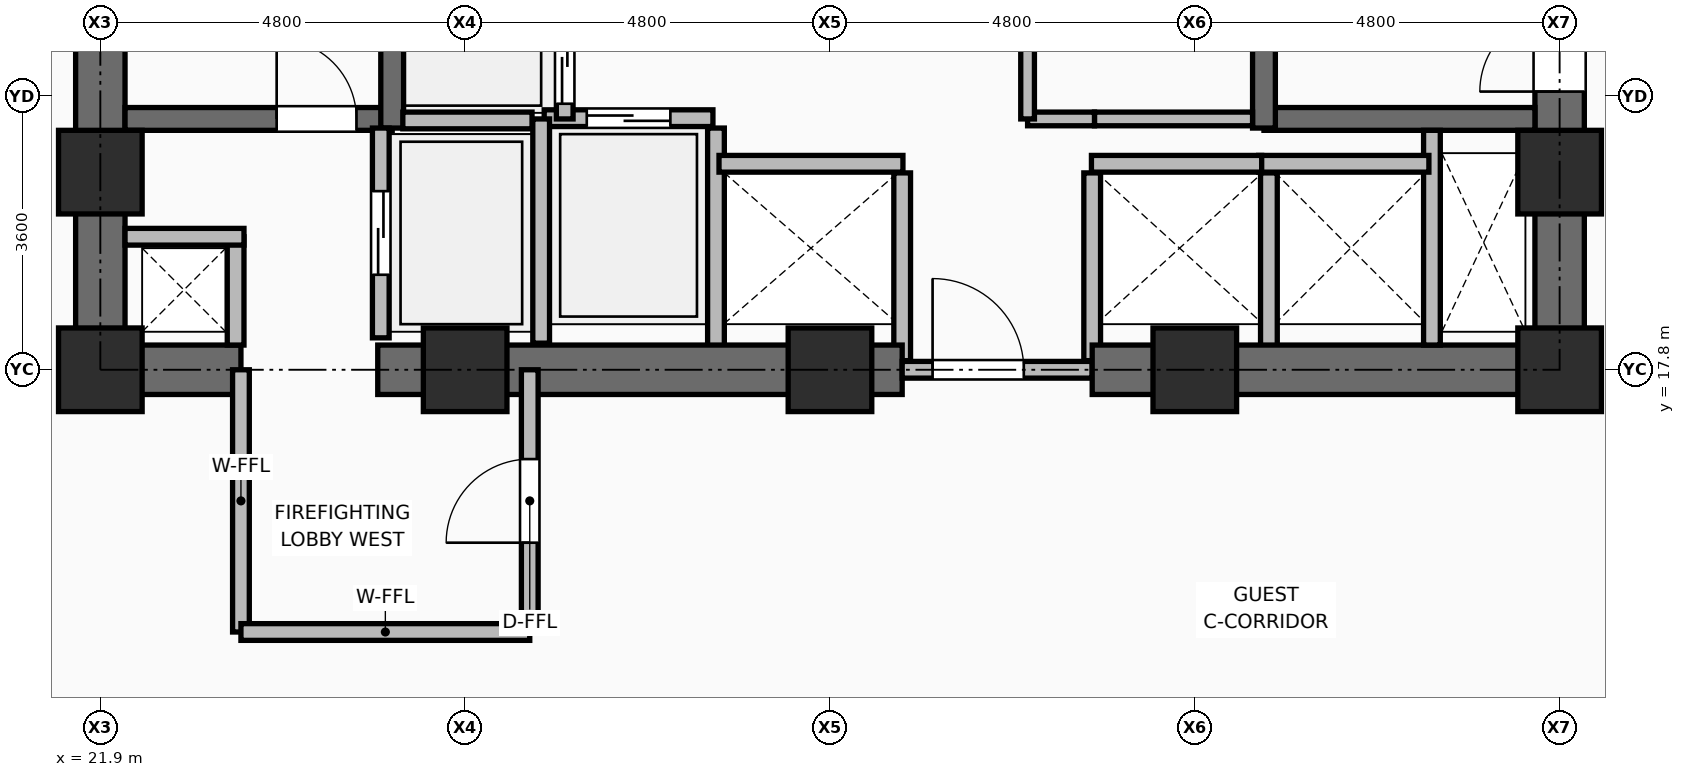
"""IFC4 building model, lengths in metres.
Left out: names, types, materials, properties, quantities, classifications, styles, units other than length and angle.
Written with IfcOpenShell. Run it as: python <this file> out.ifc"""

import sys

from ifc_helpers import new_model, si_unit, direction, frame, frame_2d, origin, origin_2d, place, context, subcontext, project, spatial, rectangle, extrude, element, fill, save


model = new_model("IFC4")
c1 = context("Model", 3, precision=1e-05, world=origin(), true_north=direction((0.0, 1.0)))
c2 = subcontext(c1, "Body", "Model", "MODEL_VIEW")
j1 = project(units=[si_unit("LENGTHUNIT", "METRE"), si_unit("PLANEANGLEUNIT", "RADIAN")], contexts=[c1])
p1 = place(None, origin())
s1 = spatial("IfcSite", under=j1, at=p1, CompositionType="ELEMENT")
p2 = place(p1, origin())
s2 = spatial("IfcBuilding", under=s1, at=p2, CompositionType="ELEMENT")
p3 = place(p2, frame((0.0, 0.0, 60.75)))
s3 = spatial("IfcBuildingStorey", under=s2, at=p3, CompositionType="ELEMENT", Elevation=60.75)
for number, where, z_axis, x_axis in (
    (1, (21.9, 17.8, 0.0), (0.0, 0.0, 1.0), (1.0, 0.0, 0.0)),
    (2, (26.7, 17.8, 0.0), (0.0, 0.0, 1.0), (1.0, 0.0, 0.0)),
    (3, (31.5, 17.8, 0.0), (0.0, 0.0, 1.0), (1.0, 0.0, 0.0)),
    (4, (36.3, 17.8, 0.0), (0.0, 0.0, 1.0), (1.0, 0.0, 0.0)),
    (5, (41.1, 17.8, 0.0), (0.0, 0.0, 1.0), (1.0, 0.0, 0.0)),
    (6, (21.9, 20.4, 0.0), (0.0, 0.0, 1.0), (1.0, 0.0, 0.0)),
    (7, (41.1, 20.4, 0.0), (0.0, 0.0, 1.0), (1.0, 0.0, 0.0)),
):
    element("IfcColumn", number, at=place(p3, frame(where, z_axis=z_axis, x_axis=x_axis)), inside=s3, PredefinedType="COLUMN", context=c2, shape_type="SweptSolid", body=[
        extrude(rectangle(XDim=1.1, YDim=1.1, at=origin_2d()), origin(), (0.0, 0.0, 1.0), 3.75),
    ])
p4 = place(p3, frame((30.0, 18.08, 0.0), z_axis=(0.0, 0.0, 1.0), x_axis=(0.0, 1.0, 0.0)))
e8 = element("IfcWall", 8, at=p4, inside=s3, PredefinedType="PARTITIONING", context=c2, shape_type="SweptSolid", body=[
    extrude(rectangle(XDim=2.9, YDim=0.22, at=frame_2d((1.45, 0.0))), origin(), (0.0, 0.0, 1.0), 3.545),
])
for number, where, z_axis, x_axis in (
    (9, (32.45, 17.92, 0.0), (0.0, 0.0, 1.0), (0.0, 1.0, 0.0)),
    (10, (34.95, 17.92, 0.0), (0.0, 0.0, 1.0), (0.0, 1.0, 0.0)),
):
    element("IfcWall", number, at=place(p3, frame(where, z_axis=z_axis, x_axis=x_axis)), inside=s3, PredefinedType="PARTITIONING", context=c2, shape_type="SweptSolid", body=[
        extrude(rectangle(XDim=2.47, YDim=0.22, at=frame_2d((1.235, 0.0))), origin(), (0.0, 0.0, 1.0), 2.928),
    ])
p5 = place(p3, frame((37.275, 18.08, 0.0), z_axis=(0.0, 0.0, 1.0), x_axis=(0.0, 1.0, 0.0)))
e11 = element("IfcWall", 11, at=p5, inside=s3, PredefinedType="PARTITIONING", context=c2, shape_type="SweptSolid", body=[
    extrude(rectangle(XDim=2.31, YDim=0.22, at=frame_2d((1.155, 0.0))), origin(), (0.0, 0.0, 1.0), 3.545),
])
p6 = place(p3, frame((21.575, 17.8, 0.0), z_axis=(0.0, 0.0, 1.0), x_axis=(1.0, 0.0, 0.0)))
e12 = element("IfcWall", 12, at=p6, inside=s3, PredefinedType="SHEAR", context=c2, shape_type="SweptSolid", body=[
    extrude(rectangle(XDim=2.175, YDim=0.65, at=frame_2d((1.087, 0.0))), origin(), (0.0, 0.0, 1.0), 3.57),
])
p7 = place(p3, frame((25.55, 17.8, 0.0), z_axis=(0.0, 0.0, 1.0), x_axis=(1.0, 0.0, 0.0)))
e13 = element("IfcWall", 13, at=p7, inside=s3, PredefinedType="SHEAR", context=c2, shape_type="SweptSolid", body=[
    extrude(rectangle(XDim=6.9, YDim=0.65, at=frame_2d((3.45, 0.0))), origin(), (0.0, 0.0, 1.0), 3.57),
])
p8 = place(p3, frame((32.45, 17.8, 0.0), z_axis=(0.0, 0.0, 1.0), x_axis=(1.0, 0.0, 0.0)))
e14 = element("IfcWall", 14, at=p8, inside=s3, PredefinedType="PARTITIONING", context=c2, shape_type="SweptSolid", body=[
    extrude(rectangle(XDim=2.5, YDim=0.22, at=frame_2d((1.25, 0.0))), origin(), (0.0, 0.0, 1.0), 2.928),
])
p9 = place(p8, frame((0.4, 0.0, 0.0)))
e15 = element("IfcOpeningElement", 15, at=p9, cuts=e14, PredefinedType="OPENING", context=c2, shape_type="SweptSolid", body=[
    extrude(rectangle(XDim=1.2, YDim=2.1, at=frame_2d((0.6, 1.05))), frame((0.0, 0.12, 0.0), z_axis=(0.0, -1.0, 0.0), x_axis=(1.0, 0.0, 0.0)), (0.0, 0.0, 1.0), 0.24),
])
p10 = place(p3, frame((34.95, 17.8, 0.0), z_axis=(0.0, 0.0, 1.0), x_axis=(1.0, 0.0, 0.0)))
e16 = element("IfcWall", 16, at=p10, inside=s3, PredefinedType="SHEAR", context=c2, shape_type="SweptSolid", body=[
    extrude(rectangle(XDim=6.475, YDim=0.65, at=frame_2d((3.238, 0.0))), origin(), (0.0, 0.0, 1.0), 3.57),
])
p11 = place(p3, frame((21.9, 18.125, 0.0), z_axis=(0.0, 0.0, 1.0), x_axis=(0.0, 1.0, 0.0)))
e17 = element("IfcWall", 17, at=p11, inside=s3, PredefinedType="SHEAR", context=c2, shape_type="SweptSolid", body=[
    extrude(rectangle(XDim=14.0, YDim=0.65, at=frame_2d((7.0, 0.0))), origin(), (0.0, 0.0, 1.0), 3.57),
])
p12 = place(p3, frame((41.1, 18.125, 0.0), z_axis=(0.0, 0.0, 1.0), x_axis=(0.0, 1.0, 0.0)))
e18 = element("IfcWall", 18, at=p12, inside=s3, PredefinedType="SHEAR", context=c2, shape_type="SweptSolid", body=[
    extrude(rectangle(XDim=14.0, YDim=0.65, at=frame_2d((7.0, 0.0))), origin(), (0.0, 0.0, 1.0), 3.57),
])
p13 = place(p12, frame((3.335, 0.0, 0.0)))
e19 = element("IfcOpeningElement", 19, at=p13, cuts=e18, PredefinedType="OPENING", context=c2, shape_type="SweptSolid", body=[
    extrude(rectangle(XDim=1.05, YDim=2.1, at=frame_2d((0.525, 1.05))), frame((0.0, 0.335, 0.0), z_axis=(0.0, -1.0, 0.0), x_axis=(1.0, 0.0, 0.0)), (0.0, 0.0, 1.0), 0.67),
])
p14 = place(p3, frame((22.225, 21.1, 0.0), z_axis=(0.0, 0.0, 1.0), x_axis=(1.0, 0.0, 0.0)))
e20 = element("IfcWall", 20, at=p14, inside=s3, PredefinedType="SHEAR", context=c2, shape_type="SweptSolid", body=[
    extrude(rectangle(XDim=3.515, YDim=0.3, at=frame_2d((1.757, 0.0))), origin(), (0.0, 0.0, 1.0), 3.57),
])
p15 = place(p14, frame((1.995, 0.0, 0.0)))
e21 = element("IfcOpeningElement", 21, at=p15, cuts=e20, PredefinedType="OPENING", context=c2, shape_type="SweptSolid", body=[
    extrude(rectangle(XDim=1.05, YDim=2.1, at=frame_2d((0.525, 1.05))), frame((0.0, 0.16, 0.0), z_axis=(0.0, -1.0, 0.0), x_axis=(1.0, 0.0, 0.0)), (0.0, 0.0, 1.0), 0.32),
])
p16 = place(p3, frame((25.74, 20.98, 0.0), z_axis=(0.0, 0.0, 1.0), x_axis=(0.0, 1.0, 0.0)))
e22 = element("IfcWall", 22, at=p16, inside=s3, PredefinedType="SHEAR", context=c2, shape_type="SweptSolid", body=[
    extrude(rectangle(XDim=7.99, YDim=0.3, at=frame_2d((3.995, 0.0))), origin(), (0.0, 0.0, 1.0), 3.57),
])
p17 = place(p3, frame((37.21, 21.1, 0.0), z_axis=(0.0, 0.0, 1.0), x_axis=(1.0, 0.0, 0.0)))
e23 = element("IfcWall", 23, at=p17, inside=s3, PredefinedType="SHEAR", context=c2, shape_type="SweptSolid", body=[
    extrude(rectangle(XDim=3.565, YDim=0.3, at=frame_2d((1.782, 0.0))), origin(), (0.0, 0.0, 1.0), 3.57),
])
p18 = place(p3, frame((37.21, 20.98, 0.0), z_axis=(0.0, 0.0, 1.0), x_axis=(0.0, 1.0, 0.0)))
e24 = element("IfcWall", 24, at=p18, inside=s3, PredefinedType="SHEAR", context=c2, shape_type="SweptSolid", body=[
    extrude(rectangle(XDim=7.99, YDim=0.3, at=frame_2d((3.995, 0.0))), origin(), (0.0, 0.0, 1.0), 3.57),
])
p19 = place(p3, frame((23.68, 18.125, 0.0), z_axis=(0.0, 0.0, 1.0), x_axis=(0.0, 1.0, 0.0)))
e25 = element("IfcWall", 25, at=p19, inside=s3, PredefinedType="PARTITIONING", context=c2, shape_type="SweptSolid", body=[
    extrude(rectangle(XDim=1.425, YDim=0.22, at=frame_2d((0.712, 0.0))), origin(), (0.0, 0.0, 1.0), 3.55),
])
p20 = place(p3, frame((22.225, 19.55, 0.0), z_axis=(0.0, 0.0, 1.0), x_axis=(1.0, 0.0, 0.0)))
e26 = element("IfcWall", 26, at=p20, inside=s3, PredefinedType="PARTITIONING", context=c2, shape_type="SweptSolid", body=[
    extrude(rectangle(XDim=1.565, YDim=0.22, at=frame_2d((0.782, 0.0))), origin(), (0.0, 0.0, 1.0), 2.595),
])
p21 = place(p3, frame((39.42, 18.125, 0.0), z_axis=(0.0, 0.0, 1.0), x_axis=(0.0, 1.0, 0.0)))
e27 = element("IfcWall", 27, at=p21, inside=s3, PredefinedType="PARTITIONING", context=c2, shape_type="SweptSolid", body=[
    extrude(rectangle(XDim=2.825, YDim=0.22, at=frame_2d((1.413, 0.0))), origin(), (0.0, 0.0, 1.0), 3.55),
])
p22 = place(p3, frame((25.59, 18.22, 0.0), z_axis=(0.0, 0.0, 1.0), x_axis=(0.0, 1.0, 0.0)))
e28 = element("IfcWall", 28, at=p22, inside=s3, PredefinedType="PARTITIONING", context=c2, shape_type="SweptSolid", body=[
    extrude(rectangle(XDim=2.76, YDim=0.22, at=frame_2d((1.38, 0.0))), origin(), (0.0, 0.0, 1.0), 3.55),
])
p23 = place(p22, frame((0.83, 0.0, 0.0)))
e29 = element("IfcOpeningElement", 29, at=p23, cuts=e28, PredefinedType="OPENING", context=c2, shape_type="SweptSolid", body=[
    extrude(rectangle(XDim=1.1, YDim=2.2, at=frame_2d((0.55, 1.1))), frame((0.0, 0.12, 0.0), z_axis=(0.0, -1.0, 0.0), x_axis=(1.0, 0.0, 0.0)), (0.0, 0.0, 1.0), 0.24),
])
p24 = place(p3, frame((27.74, 21.11, 0.0), z_axis=(0.0, 0.0, 1.0), x_axis=(1.0, 0.0, 0.0)))
e30 = element("IfcWall", 30, at=p24, inside=s3, PredefinedType="PARTITIONING", context=c2, shape_type="SweptSolid", body=[
    extrude(rectangle(XDim=2.22, YDim=0.22, at=frame_2d((1.11, 0.0))), origin(), (0.0, 0.0, 1.0), 3.55),
])
p25 = place(p24, frame((0.56, 0.0, 0.0)))
e31 = element("IfcOpeningElement", 31, at=p25, cuts=e30, PredefinedType="OPENING", context=c2, shape_type="SweptSolid", body=[
    extrude(rectangle(XDim=1.1, YDim=2.2, at=frame_2d((0.55, 1.1))), frame((0.0, 0.12, 0.0), z_axis=(0.0, -1.0, 0.0), x_axis=(1.0, 0.0, 0.0)), (0.0, 0.0, 1.0), 0.24),
])
p26 = place(p3, frame((30.04, 20.51, 0.0), z_axis=(0.0, 0.0, 1.0), x_axis=(1.0, 0.0, 0.0)))
e32 = element("IfcWall", 32, at=p26, inside=s3, PredefinedType="PARTITIONING", context=c2, shape_type="SweptSolid", body=[
    extrude(rectangle(XDim=2.42, YDim=0.22, at=frame_2d((1.21, 0.0))), origin(), (0.0, 0.0, 1.0), 3.55),
])
for number, where, z_axis, x_axis in (
    (33, (37.14, 20.51, 0.0), (0.0, 0.0, 1.0), (1.0, 0.0, 0.0)),
    (34, (34.94, 20.51, 0.0), (0.0, 0.0, 1.0), (1.0, 0.0, 0.0)),
):
    element("IfcWall", number, at=place(p3, frame(where, z_axis=z_axis, x_axis=x_axis)), inside=s3, PredefinedType="PARTITIONING", context=c2, shape_type="SweptSolid", body=[
        extrude(rectangle(XDim=2.24, YDim=0.22, at=frame_2d((1.12, 0.0))), origin(), (0.0, 0.0, 1.0), 3.55),
    ])
p27 = place(p3, frame((28.01, 21.1, 0.0), z_axis=(0.0, 0.0, 1.0), x_axis=(0.0, 1.0, 0.0)))
e35 = element("IfcWall", 35, at=p27, inside=s3, PredefinedType="PARTITIONING", context=c2, shape_type="SweptSolid", body=[
    extrude(rectangle(XDim=1.5, YDim=0.22, at=frame_2d((0.75, 0.0))), origin(), (0.0, 0.0, 1.0), 3.55),
])
p28 = place(p27, frame((0.2, 0.0, 0.0)))
e36 = element("IfcOpeningElement", 36, at=p28, cuts=e35, PredefinedType="OPENING", context=c2, shape_type="SweptSolid", body=[
    extrude(rectangle(XDim=1.1, YDim=2.2, at=frame_2d((0.55, 1.1))), frame((0.0, 0.12, 0.0), z_axis=(0.0, -1.0, 0.0), x_axis=(1.0, 0.0, 0.0)), (0.0, 0.0, 1.0), 0.24),
])
p29 = place(p3, frame((27.7, 18.15, 0.0), z_axis=(0.0, 0.0, 1.0), x_axis=(0.0, 1.0, 0.0)))
e37 = element("IfcWall", 37, at=p29, inside=s3, PredefinedType="PARTITIONING", context=c2, shape_type="SweptSolid", body=[
    extrude(rectangle(XDim=2.95, YDim=0.22, at=frame_2d((1.475, 0.0))), origin(), (0.0, 0.0, 1.0), 3.55),
])
p30 = place(p3, frame((25.88, 21.08, 0.0), z_axis=(0.0, 0.0, 1.0), x_axis=(1.0, 0.0, 0.0)))
e38 = element("IfcWall", 38, at=p30, inside=s3, PredefinedType="PARTITIONING", context=c2, shape_type="SweptSolid", body=[
    extrude(rectangle(XDim=1.7, YDim=0.22, at=frame_2d((0.85, 0.0))), origin(), (0.0, 0.0, 1.0), 3.55),
])
p31 = place(p3, frame((34.98, 21.1, 0.0), z_axis=(0.0, 0.0, 1.0), x_axis=(1.0, 0.0, 0.0)))
e39 = element("IfcWall", 39, at=p31, inside=s3, PredefinedType="PARTITIONING", context=c2, shape_type="SweptSolid", body=[
    extrude(rectangle(XDim=2.08, YDim=0.18, at=frame_2d((1.04, 0.0))), origin(), (0.0, 0.0, 1.0), 3.55),
])
p32 = place(p3, frame((34.1, 21.1, 0.0), z_axis=(0.0, 0.0, 1.0), x_axis=(1.0, 0.0, 0.0)))
e40 = element("IfcWall", 40, at=p32, inside=s3, PredefinedType="PARTITIONING", context=c2, shape_type="SweptSolid", body=[
    extrude(rectangle(XDim=0.88, YDim=0.18, at=frame_2d((0.44, 0.0))), origin(), (0.0, 0.0, 1.0), 3.55),
])
p33 = place(p3, frame((34.1, 21.1, 0.0), z_axis=(0.0, 0.0, 1.0), x_axis=(0.0, 1.0, 0.0)))
e41 = element("IfcWall", 41, at=p33, inside=s3, PredefinedType="PARTITIONING", context=c2, shape_type="SweptSolid", body=[
    extrude(rectangle(XDim=4.55, YDim=0.18, at=frame_2d((2.275, 0.0))), origin(), (0.0, 0.0, 1.0), 3.55),
])
p34 = place(p33, frame((1.825, 0.0, 0.0)))
e42 = element("IfcOpeningElement", 42, at=p34, cuts=e41, PredefinedType="OPENING", context=c2, shape_type="SweptSolid", body=[
    extrude(rectangle(XDim=0.9, YDim=2.1, at=frame_2d((0.45, 1.05))), frame((0.0, 0.1, 0.0), z_axis=(0.0, -1.0, 0.0), x_axis=(1.0, 0.0, 0.0)), (0.0, 0.0, 1.0), 0.2),
])
p35 = place(p3, frame((23.75, 14.35, 0.0), z_axis=(0.0, 0.0, 1.0), x_axis=(0.0, 1.0, 0.0)))
e43 = element("IfcWall", 43, at=p35, inside=s3, PredefinedType="PARTITIONING", context=c2, shape_type="SweptSolid", body=[
    extrude(rectangle(XDim=3.45, YDim=0.22, at=frame_2d((1.725, 0.0))), origin(), (0.0, 0.0, 1.0), 2.928),
])
p36 = place(p3, frame((23.75, 14.35, 0.0), z_axis=(0.0, 0.0, 1.0), x_axis=(1.0, 0.0, 0.0)))
e44 = element("IfcWall", 44, at=p36, inside=s3, PredefinedType="PARTITIONING", context=c2, shape_type="SweptSolid", body=[
    extrude(rectangle(XDim=3.8, YDim=0.22, at=frame_2d((1.9, 0.0))), origin(), (0.0, 0.0, 1.0), 3.55),
])
p37 = place(p3, frame((27.55, 14.35, 0.0), z_axis=(0.0, 0.0, 1.0), x_axis=(0.0, 1.0, 0.0)))
e45 = element("IfcWall", 45, at=p37, inside=s3, PredefinedType="PARTITIONING", context=c2, shape_type="SweptSolid", body=[
    extrude(rectangle(XDim=3.45, YDim=0.22, at=frame_2d((1.725, 0.0))), origin(), (0.0, 0.0, 1.0), 2.928),
])
p38 = place(p37, frame((1.175, 0.0, 0.0)))
e46 = element("IfcOpeningElement", 46, at=p38, cuts=e45, PredefinedType="OPENING", context=c2, shape_type="SweptSolid", body=[
    extrude(rectangle(XDim=1.1, YDim=2.1, at=frame_2d((0.55, 1.05))), frame((0.0, 0.12, 0.0), z_axis=(0.0, -1.0, 0.0), x_axis=(1.0, 0.0, 0.0)), (0.0, 0.0, 1.0), 0.24),
])
p39 = place(p9, origin())
e47 = element("IfcDoor", 47, at=p39, inside=s3, OperationType="SINGLE_SWING_LEFT", PredefinedType="DOOR", context=c2, shape_type="SweptSolid", body=[
    extrude(rectangle(XDim=1.2, YDim=2.1, at=frame_2d((0.6, 1.05))), frame((0.0, 0.025, 0.0), z_axis=(0.0, -1.0, 0.0), x_axis=(1.0, 0.0, 0.0)), (0.0, 0.0, 1.0), 0.05),
])
fill(e15, e47)
p40 = place(p15, origin())
e48 = element("IfcDoor", 48, at=p40, inside=s3, OperationType="SINGLE_SWING_LEFT", PredefinedType="DOOR", context=c2, shape_type="SweptSolid", body=[
    extrude(rectangle(XDim=1.05, YDim=2.1, at=frame_2d((0.525, 1.05))), frame((0.0, 0.025, 0.0), z_axis=(0.0, -1.0, 0.0), x_axis=(1.0, 0.0, 0.0)), (0.0, 0.0, 1.0), 0.05),
])
fill(e21, e48)
p41 = place(p13, origin())
e49 = element("IfcDoor", 49, at=p41, inside=s3, OperationType="SINGLE_SWING_LEFT", PredefinedType="DOOR", context=c2, shape_type="SweptSolid", body=[
    extrude(rectangle(XDim=1.05, YDim=2.1, at=frame_2d((0.525, 1.05))), frame((0.0, 0.025, 0.0), z_axis=(0.0, -1.0, 0.0), x_axis=(1.0, 0.0, 0.0)), (0.0, 0.0, 1.0), 0.05),
])
fill(e19, e49)
p42 = place(p23, origin())
e50 = element("IfcDoor", 50, at=p42, inside=s3, OperationType="DOUBLE_DOOR_SLIDING", PredefinedType="DOOR", context=c2, shape_type="SweptSolid", body=[
    extrude(rectangle(XDim=1.1, YDim=2.2, at=frame_2d((0.55, 1.1))), frame((0.0, 0.025, 0.0), z_axis=(0.0, -1.0, 0.0), x_axis=(1.0, 0.0, 0.0)), (0.0, 0.0, 1.0), 0.05),
])
fill(e29, e50)
p43 = place(p25, origin())
e51 = element("IfcDoor", 51, at=p43, inside=s3, OperationType="DOUBLE_DOOR_SLIDING", PredefinedType="DOOR", context=c2, shape_type="SweptSolid", body=[
    extrude(rectangle(XDim=1.1, YDim=2.2, at=frame_2d((0.55, 1.1))), frame((0.0, 0.025, 0.0), z_axis=(0.0, -1.0, 0.0), x_axis=(1.0, 0.0, 0.0)), (0.0, 0.0, 1.0), 0.05),
])
fill(e31, e51)
p44 = place(p28, frame((1.1, 0.0, 0.0), z_axis=(0.0, 0.0, 1.0), x_axis=(-1.0, 0.0, 0.0)))
e52 = element("IfcDoor", 52, at=p44, inside=s3, OperationType="DOUBLE_DOOR_SLIDING", PredefinedType="DOOR", context=c2, shape_type="SweptSolid", body=[
    extrude(rectangle(XDim=1.1, YDim=2.2, at=frame_2d((0.55, 1.1))), frame((0.0, 0.025, 0.0), z_axis=(0.0, -1.0, 0.0), x_axis=(1.0, 0.0, 0.0)), (0.0, 0.0, 1.0), 0.05),
])
fill(e36, e52)
p45 = place(p38, origin())
e53 = element("IfcDoor", 53, at=p45, inside=s3, OperationType="SINGLE_SWING_LEFT", PredefinedType="DOOR", context=c2, shape_type="SweptSolid", body=[
    extrude(rectangle(XDim=1.1, YDim=2.1, at=frame_2d((0.55, 1.05))), frame((0.0, 0.025, 0.0), z_axis=(0.0, -1.0, 0.0), x_axis=(1.0, 0.0, 0.0)), (0.0, 0.0, 1.0), 0.05),
])
fill(e46, e53)
save(model, sys.argv[1])
